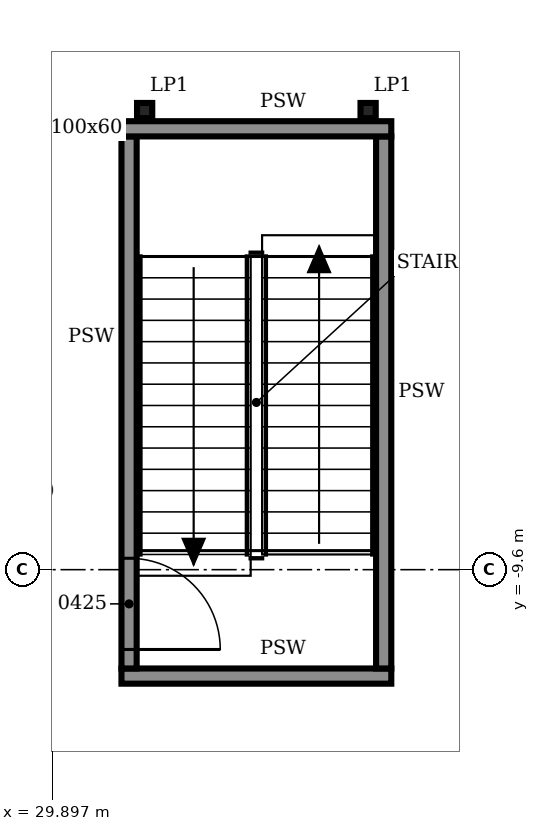
"""IFC4 building model, lengths in metres.
Left out: names, types, materials, properties, quantities, classifications, styles, units other than length and angle.
Written with IfcOpenShell. Run it as: python <this file> out.ifc"""

import sys

from ifc_helpers import new_model, si_unit, direction, frame, frame_2d, origin, origin_2d, place, context, subcontext, project, spatial, rectangle, i_section, extrude, element, fill, save


model = new_model("IFC4")
c1 = context("Model", 3, precision=1e-05, world=origin(), true_north=direction((0.0, 1.0)))
c2 = subcontext(c1, "Body", "Model", "MODEL_VIEW")
j1 = project(units=[si_unit("LENGTHUNIT", "METRE"), si_unit("PLANEANGLEUNIT", "RADIAN")], contexts=[c1])
p1 = place(None, origin())
s1 = spatial("IfcSite", under=j1, at=p1, CompositionType="ELEMENT")
p2 = place(p1, origin())
s2 = spatial("IfcBuilding", under=s1, at=p2, CompositionType="ELEMENT")
p3 = place(p2, frame((0.0, 0.0, 25.8)))
s3 = spatial("IfcBuildingStorey", under=s2, at=p3, CompositionType="ELEMENT", Elevation=25.8)
for number, where, z_axis, x_axis in (
    (1, (31.105, -3.56, 0.0), (0.0, 0.0, 1.0), (1.0, 0.0, 0.0)),
    (2, (34.045, -3.56, 0.0), (0.0, 0.0, 1.0), (1.0, 0.0, 0.0)),
):
    element("IfcColumn", number, at=place(p3, frame(where, z_axis=z_axis, x_axis=x_axis)), inside=s3, PredefinedType="COLUMN", context=c2, shape_type="SweptSolid", body=[
        extrude(i_section(OverallWidth=0.2, OverallDepth=0.2, WebThickness=0.009, FlangeThickness=0.015, FilletRadius=0.018, at=origin_2d()), origin(), (0.0, 0.0, 1.0), 4.8),
    ])
p4 = place(p3, frame((30.8, -11.0, 0.0), z_axis=(0.0, 0.0, 1.0), x_axis=(1.0, 0.0, 0.0)))
e3 = element("IfcWall", 3, at=p4, inside=s3, PredefinedType="SOLIDWALL", context=c2, shape_type="SweptSolid", body=[
    extrude(rectangle(XDim=3.55, YDim=0.2, at=frame_2d((1.775, 0.0))), origin(), (0.0, 0.0, 1.0), 4.6),
])
p5 = place(p3, frame((30.9, -10.9, 0.0), z_axis=(0.0, 0.0, 1.0), x_axis=(0.0, 1.0, 0.0)))
e4 = element("IfcWall", 4, at=p5, inside=s3, PredefinedType="SOLIDWALL", context=c2, shape_type="SweptSolid", body=[
    extrude(rectangle(XDim=7.0, YDim=0.2, at=frame_2d((3.5, 0.0))), origin(), (0.0, 0.0, 1.0), 4.6),
])
p6 = place(p5, frame((0.25, 0.0, 0.0)))
e5 = element("IfcOpeningElement", 5, at=p6, cuts=e4, PredefinedType="OPENING", context=c2, shape_type="SweptSolid", body=[
    extrude(rectangle(XDim=1.2, YDim=2.1, at=frame_2d((0.6, 1.05))), frame((0.0, 0.11, 0.0), z_axis=(0.0, -1.0, 0.0), x_axis=(1.0, 0.0, 0.0)), (0.0, 0.0, 1.0), 0.22),
])
p7 = place(p3, frame((34.25, -10.9, 0.0), z_axis=(0.0, 0.0, 1.0), x_axis=(0.0, 1.0, 0.0)))
e6 = element("IfcWall", 6, at=p7, inside=s3, PredefinedType="SOLIDWALL", context=c2, shape_type="SweptSolid", body=[
    extrude(rectangle(XDim=7.0, YDim=0.2, at=frame_2d((3.5, 0.0))), origin(), (0.0, 0.0, 1.0), 4.6),
])
p8 = place(p3, frame((30.8, -3.8, 0.0), z_axis=(0.0, 0.0, 1.0), x_axis=(1.0, 0.0, 0.0)))
e7 = element("IfcWall", 7, at=p8, inside=s3, PredefinedType="SOLIDWALL", context=c2, shape_type="SweptSolid", body=[
    extrude(rectangle(XDim=3.55, YDim=0.2, at=frame_2d((1.775, 0.0))), origin(), (0.0, 0.0, 1.0), 4.6),
])
p9 = place(p6, frame((1.2, 0.0, 0.0), z_axis=(0.0, 0.0, 1.0), x_axis=(-1.0, 0.0, 0.0)))
e8 = element("IfcDoor", 8, at=p9, inside=s3, OperationType="SINGLE_SWING_RIGHT", PredefinedType="DOOR", context=c2, shape_type="SweptSolid", body=[
    extrude(rectangle(XDim=1.2, YDim=2.1, at=frame_2d((0.6, 1.05))), frame((0.0, 0.025, 0.0), z_axis=(0.0, -1.0, 0.0), x_axis=(1.0, 0.0, 0.0)), (0.0, 0.0, 1.0), 0.05),
])
fill(e5, e8)
save(model, sys.argv[1])
